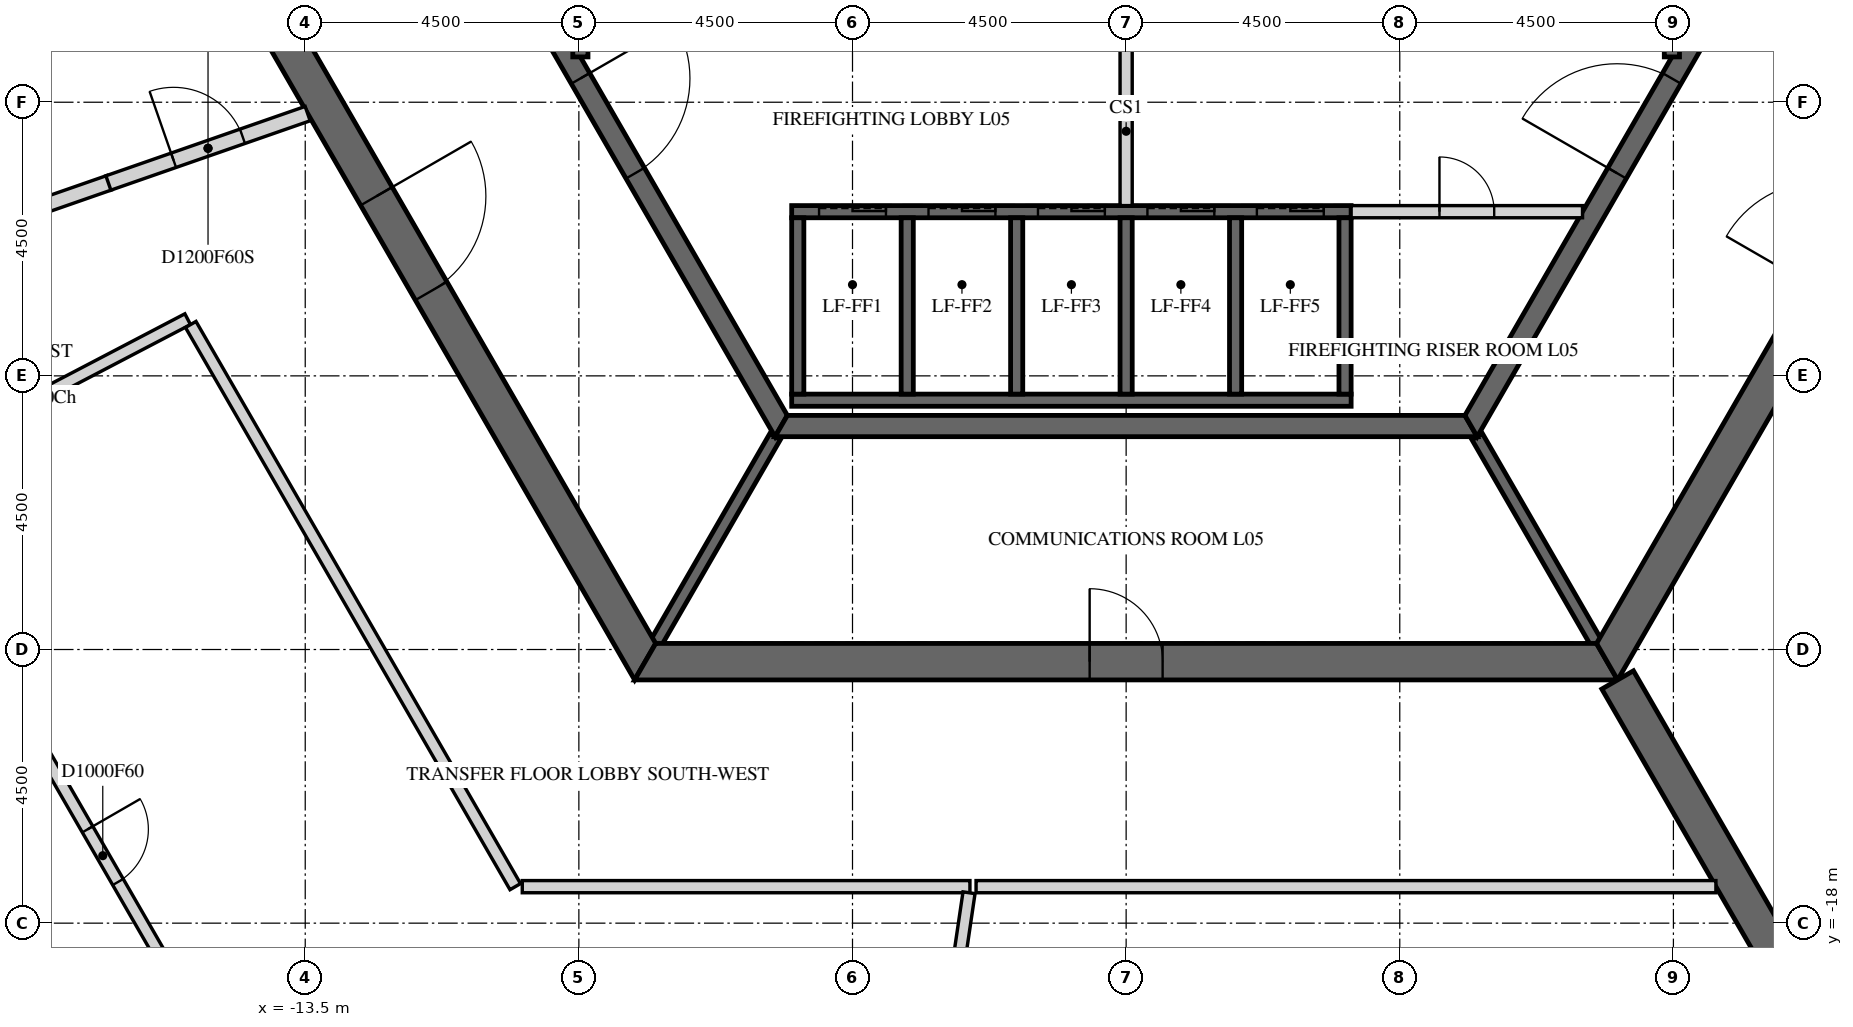
"""IFC4 building model, lengths in metres.
Left out: names, types, materials, properties, quantities, classifications, styles, units other than length and angle.
Written with IfcOpenShell. Run it as: python <this file> out.ifc"""

import sys

from ifc_helpers import new_model, si_unit, direction, frame, frame_2d, origin, place, context, subcontext, project, spatial, polyline, rectangle, outline, extrude, element, fill, save


model = new_model("IFC4")
c1 = context("Model", 3, precision=1e-05, world=origin(), true_north=direction((0.0, 1.0)))
c2 = subcontext(c1, "Body", "Model", "MODEL_VIEW")
j1 = project(units=[si_unit("LENGTHUNIT", "METRE"), si_unit("PLANEANGLEUNIT", "RADIAN")], contexts=[c1])
p1 = place(None, origin())
s1 = spatial("IfcSite", under=j1, at=p1, CompositionType="ELEMENT")
p2 = place(p1, origin())
s2 = spatial("IfcBuilding", under=s1, at=p2, CompositionType="ELEMENT")
p3 = place(p2, frame((0.0, 0.0, 31.5)))
s3 = spatial("IfcBuildingStorey", under=s2, at=p3, CompositionType="ELEMENT", Elevation=31.5)
p4 = place(p3, frame((-15.819, 0.0, -0.3), z_axis=(0.0, 0.0, 1.0), x_axis=(0.499999880136, -0.866025472988, 0.0)))
e1 = element("IfcWall", 1, at=p4, inside=s3, PredefinedType="SHEAR", context=c2, shape_type="SweptSolid", body=[
    extrude(outline(polyline([(-0.173, -0.3), (15.993, -0.3), (15.646, 0.3), (0.173, 0.3), (-0.173, -0.3)])), origin(), (0.0, 0.0, 1.0), 6.15),
])
p5 = place(p4, frame((6.981, 0.0, 0.3)))
e2 = element("IfcOpeningElement", 2, at=p5, cuts=e1, PredefinedType="OPENING", context=c2, shape_type="SweptSolid", body=[
    extrude(rectangle(XDim=1.8, YDim=2.4, at=frame_2d((0.9, 1.2))), frame((0.0, 0.31, 0.0), z_axis=(0.0, -1.0, 0.0), x_axis=(1.0, 0.0, 0.0)), (0.0, 0.0, 1.0), 0.62),
])
p6 = place(p3, frame((-7.91, -13.7, -0.3), z_axis=(0.0, 0.0, 1.0), x_axis=(1.0, 0.0, 0.0)))
e3 = element("IfcWall", 3, at=p6, inside=s3, PredefinedType="SHEAR", context=c2, shape_type="SweptSolid", body=[
    extrude(outline(polyline([(-0.173, -0.3), (15.993, -0.3), (15.646, 0.3), (0.173, 0.3), (-0.173, -0.3)])), origin(), (0.0, 0.0, 1.0), 6.15),
])
p7 = place(p6, frame((7.31, 0.0, 0.3)))
e4 = element("IfcOpeningElement", 4, at=p7, cuts=e3, PredefinedType="OPENING", context=c2, shape_type="SweptSolid", body=[
    extrude(rectangle(XDim=1.2, YDim=2.4, at=frame_2d((0.6, 1.2))), frame((0.0, 0.31, 0.0), z_axis=(0.0, -1.0, 0.0), x_axis=(1.0, 0.0, 0.0)), (0.0, 0.0, 1.0), 0.62),
])
p8 = place(p3, frame((7.91, -13.7, -0.3), z_axis=(0.0, 0.0, 1.0), x_axis=(0.499999880136, 0.866025472988, 0.0)))
e5 = element("IfcWall", 5, at=p8, inside=s3, PredefinedType="SHEAR", context=c2, shape_type="SweptSolid", body=[
    extrude(outline(polyline([(-0.173, -0.3), (15.993, -0.3), (15.646, 0.3), (0.173, 0.3), (-0.173, -0.3)])), origin(), (0.0, 0.0, 1.0), 6.15),
])
p9 = place(p8, frame((7.039, 0.0, 0.3)))
e6 = element("IfcOpeningElement", 6, at=p9, cuts=e5, PredefinedType="OPENING", context=c2, shape_type="SweptSolid", body=[
    extrude(rectangle(XDim=1.8, YDim=2.4, at=frame_2d((0.9, 1.2))), frame((0.0, 0.31, 0.0), z_axis=(0.0, -1.0, 0.0), x_axis=(1.0, 0.0, 0.0)), (0.0, 0.0, 1.0), 0.62),
])
p10 = place(p3, frame((8.083, -14.0, -0.3), z_axis=(0.0, 0.0, 1.0), x_axis=(0.499997680643, -0.866026742862, 0.0)))
e7 = element("IfcWall", 7, at=p10, inside=s3, PredefinedType="SHEAR", context=c2, shape_type="SweptSolid", body=[
    extrude(rectangle(XDim=16.509, YDim=0.6, at=frame_2d((8.254, 0.0))), origin(), (0.0, 0.0, 1.0), 6.15),
])
p11 = place(p10, frame((7.354, 0.0, 0.3)))
e8 = element("IfcOpeningElement", 8, at=p11, cuts=e7, PredefinedType="OPENING", context=c2, shape_type="SweptSolid", body=[
    extrude(rectangle(XDim=1.8, YDim=2.4, at=frame_2d((0.9, 1.2))), frame((0.0, 0.31, 0.0), z_axis=(0.0, -1.0, 0.0), x_axis=(1.0, 0.0, 0.0)), (0.0, 0.0, 1.0), 0.62),
])
p12 = place(p3, frame((-11.345, 0.0, -0.3), z_axis=(0.0, 0.0, 1.0), x_axis=(0.499995046907, -0.866028263435, 0.0)))
e9 = element("IfcWall", 9, at=p12, inside=s3, PredefinedType="SHEAR", context=c2, shape_type="SweptSolid", body=[
    extrude(outline(polyline([(-0.101, -0.175), (11.446, -0.175), (11.244, 0.175), (0.101, 0.175), (-0.101, -0.175)])), origin(), (0.0, 0.0, 1.0), 6.15),
])
p13 = place(p12, frame((4.744, 0.0, 0.3)))
e10 = element("IfcOpeningElement", 10, at=p13, cuts=e9, PredefinedType="OPENING", context=c2, shape_type="SweptSolid", body=[
    extrude(rectangle(XDim=1.8, YDim=2.4, at=frame_2d((0.9, 1.2))), frame((0.0, 0.185, 0.0), z_axis=(0.0, -1.0, 0.0), x_axis=(1.0, 0.0, 0.0)), (0.0, 0.0, 1.0), 0.37),
])
p14 = place(p3, frame((-5.673, -9.825, -0.3), z_axis=(0.0, 0.0, 1.0), x_axis=(1.0, 0.0, 0.0)))
e11 = element("IfcWall", 11, at=p14, inside=s3, PredefinedType="SHEAR", context=c2, shape_type="SweptSolid", body=[
    extrude(outline(polyline([(-0.101, -0.175), (11.446, -0.175), (11.244, 0.175), (0.101, 0.175), (-0.101, -0.175)])), origin(), (0.0, 0.0, 1.0), 6.15),
])
p15 = place(p3, frame((5.673, -9.825, -0.3), z_axis=(0.0, 0.0, 1.0), x_axis=(0.499995046907, 0.866028263435, 0.0)))
e12 = element("IfcWall", 12, at=p15, inside=s3, PredefinedType="SHEAR", context=c2, shape_type="SweptSolid", body=[
    extrude(outline(polyline([(-0.101, -0.175), (11.446, -0.175), (11.244, 0.175), (0.101, 0.175), (-0.101, -0.175)])), origin(), (0.0, 0.0, 1.0), 6.15),
])
p16 = place(p15, frame((4.801, 0.0, 0.3)))
e13 = element("IfcOpeningElement", 13, at=p16, cuts=e12, PredefinedType="OPENING", context=c2, shape_type="SweptSolid", body=[
    extrude(rectangle(XDim=1.8, YDim=2.4, at=frame_2d((0.9, 1.2))), frame((0.0, 0.185, 0.0), z_axis=(0.0, -1.0, 0.0), x_axis=(1.0, 0.0, 0.0)), (0.0, 0.0, 1.0), 0.37),
])
p17 = place(p3, frame((-5.5, -6.3, -0.25), z_axis=(0.0, 0.0, 1.0), x_axis=(1.0, 0.0, 0.0)))
e14 = element("IfcWall", 14, at=p17, inside=s3, PredefinedType="SHEAR", context=c2, shape_type="SweptSolid", body=[
    extrude(rectangle(XDim=9.2, YDim=0.2, at=frame_2d((4.6, 0.0))), origin(), (0.0, 0.0, 1.0), 6.0),
])
p18 = place(p17, frame((0.45, 0.0, 0.25)))
e15 = element("IfcOpeningElement", 15, at=p18, cuts=e14, PredefinedType="OPENING", context=c2, shape_type="SweptSolid", body=[
    extrude(rectangle(XDim=1.1, YDim=2.1, at=frame_2d((0.55, 1.05))), frame((0.0, 0.11, 0.0), z_axis=(0.0, -1.0, 0.0), x_axis=(1.0, 0.0, 0.0)), (0.0, 0.0, 1.0), 0.22),
])
p19 = place(p17, frame((2.25, 0.0, 0.25)))
e16 = element("IfcOpeningElement", 16, at=p19, cuts=e14, PredefinedType="OPENING", context=c2, shape_type="SweptSolid", body=[
    extrude(rectangle(XDim=1.1, YDim=2.1, at=frame_2d((0.55, 1.05))), frame((0.0, 0.11, 0.0), z_axis=(0.0, -1.0, 0.0), x_axis=(1.0, 0.0, 0.0)), (0.0, 0.0, 1.0), 0.22),
])
p20 = place(p17, frame((4.05, 0.0, 0.25)))
e17 = element("IfcOpeningElement", 17, at=p20, cuts=e14, PredefinedType="OPENING", context=c2, shape_type="SweptSolid", body=[
    extrude(rectangle(XDim=1.1, YDim=2.1, at=frame_2d((0.55, 1.05))), frame((0.0, 0.11, 0.0), z_axis=(0.0, -1.0, 0.0), x_axis=(1.0, 0.0, 0.0)), (0.0, 0.0, 1.0), 0.22),
])
p21 = place(p17, frame((5.85, 0.0, 0.25)))
e18 = element("IfcOpeningElement", 18, at=p21, cuts=e14, PredefinedType="OPENING", context=c2, shape_type="SweptSolid", body=[
    extrude(rectangle(XDim=1.1, YDim=2.1, at=frame_2d((0.55, 1.05))), frame((0.0, 0.11, 0.0), z_axis=(0.0, -1.0, 0.0), x_axis=(1.0, 0.0, 0.0)), (0.0, 0.0, 1.0), 0.22),
])
p22 = place(p17, frame((7.65, 0.0, 0.25)))
e19 = element("IfcOpeningElement", 19, at=p22, cuts=e14, PredefinedType="OPENING", context=c2, shape_type="SweptSolid", body=[
    extrude(rectangle(XDim=1.1, YDim=2.1, at=frame_2d((0.55, 1.05))), frame((0.0, 0.11, 0.0), z_axis=(0.0, -1.0, 0.0), x_axis=(1.0, 0.0, 0.0)), (0.0, 0.0, 1.0), 0.22),
])
p23 = place(p3, frame((-5.5, -9.4, -0.25), z_axis=(0.0, 0.0, 1.0), x_axis=(1.0, 0.0, 0.0)))
e20 = element("IfcWall", 20, at=p23, inside=s3, PredefinedType="SHEAR", context=c2, shape_type="SweptSolid", body=[
    extrude(rectangle(XDim=9.2, YDim=0.2, at=frame_2d((4.6, 0.0))), origin(), (0.0, 0.0, 1.0), 6.0),
])
for number, where, z_axis, x_axis in (
    (21, (-5.4, -9.3, -0.25), (0.0, 0.0, 1.0), (0.0, 1.0, 0.0)),
    (22, (-3.6, -9.3, -0.25), (0.0, 0.0, 1.0), (0.0, 1.0, 0.0)),
    (23, (-1.8, -9.3, -0.25), (0.0, 0.0, 1.0), (0.0, 1.0, 0.0)),
    (24, (0.0, -9.3, -0.25), (0.0, 0.0, 1.0), (0.0, 1.0, 0.0)),
    (25, (1.8, -9.3, -0.25), (0.0, 0.0, 1.0), (0.0, 1.0, 0.0)),
    (26, (3.6, -9.3, -0.25), (0.0, 0.0, 1.0), (0.0, 1.0, 0.0)),
):
    element("IfcWall", number, at=place(p3, frame(where, z_axis=z_axis, x_axis=x_axis)), inside=s3, PredefinedType="SHEAR", context=c2, shape_type="SweptSolid", body=[
        extrude(rectangle(XDim=2.9, YDim=0.2, at=frame_2d((1.45, 0.0))), origin(), (0.0, 0.0, 1.0), 6.0),
    ])
p24 = place(p3, frame((0.0, -6.2, 0.0), z_axis=(0.0, 0.0, 1.0), x_axis=(0.0, 1.0, 0.0)))
e27 = element("IfcWall", 27, at=p24, inside=s3, PredefinedType="PARTITIONING", context=c2, shape_type="SweptSolid", body=[
    extrude(rectangle(XDim=6.1, YDim=0.2, at=frame_2d((3.05, 0.0))), origin(), (0.0, 0.0, 1.0), 5.75),
])
p25 = place(p3, frame((3.7, -6.3, 0.0), z_axis=(0.0, 0.0, 1.0), x_axis=(1.0, 0.0, 0.0)))
e28 = element("IfcWall", 28, at=p25, inside=s3, PredefinedType="PARTITIONING", context=c2, shape_type="SweptSolid", body=[
    extrude(rectangle(XDim=3.806, YDim=0.2, at=frame_2d((1.903, 0.0))), origin(), (0.0, 0.0, 1.0), 5.75),
])
p26 = place(p25, frame((1.453, 0.0, 0.0)))
e29 = element("IfcOpeningElement", 29, at=p26, cuts=e28, PredefinedType="OPENING", context=c2, shape_type="SweptSolid", body=[
    extrude(rectangle(XDim=0.9, YDim=2.1, at=frame_2d((0.45, 1.05))), frame((0.0, 0.11, 0.0), z_axis=(0.0, -1.0, 0.0), x_axis=(1.0, 0.0, 0.0)), (0.0, 0.0, 1.0), 0.22),
])
for number, where, z_axis, x_axis in (
    (30, (-5.773, -10.0, -0.3), (0.0, 0.0, 1.0), (-0.5, -0.866, 0.0)),
    (31, (5.773, -10.0, -0.3), (0.0, 0.0, 1.0), (0.5, -0.866, 0.0)),
):
    element("IfcWall", number, at=place(p3, frame(where, z_axis=z_axis, x_axis=x_axis)), inside=s3, PredefinedType="SHEAR", context=c2, shape_type="SweptSolid", body=[
        extrude(rectangle(XDim=3.926, YDim=0.2, at=frame_2d((1.963, 0.0))), origin(), (0.0, 0.0, 1.0), 6.15),
    ])
for number, where, z_axis, x_axis in (
    (32, (8.975, -3.755, -0.25), (0.0, 0.0, 1.0), (0.0, 1.0, 0.0)),
    (33, (-8.975, -3.755, -0.25), (0.0, 0.0, 1.0), (0.0, 1.0, 0.0)),
):
    element("IfcWall", number, at=place(p3, frame(where, z_axis=z_axis, x_axis=x_axis)), inside=s3, PredefinedType="SHEAR", context=c2, shape_type="SweptSolid", body=[
        extrude(rectangle(XDim=7.51, YDim=0.25, at=frame_2d((3.755, 0.0))), origin(), (0.0, 0.0, 1.0), 6.0),
    ])
p27 = place(p3, frame((-16.286, -23.432, 0.0), z_axis=(0.0, 0.0, 1.0), x_axis=(-0.49996436611, 0.866045976043, 0.0)))
e34 = element("IfcWall", 34, at=p27, inside=s3, PredefinedType="PARTITIONING", context=c2, shape_type="SweptSolid", body=[
    extrude(rectangle(XDim=16.948, YDim=0.2, at=frame_2d((8.474, 0.0))), origin(), (0.0, 0.0, 1.0), 5.85),
])
p28 = place(p27, frame((7.974, 0.0, 0.0)))
e35 = element("IfcOpeningElement", 35, at=p28, cuts=e34, PredefinedType="OPENING", context=c2, shape_type="SweptSolid", body=[
    extrude(rectangle(XDim=1.0, YDim=2.1, at=frame_2d((0.5, 1.05))), frame((0.0, 0.11, 0.0), z_axis=(0.0, -1.0, 0.0), x_axis=(1.0, 0.0, 0.0)), (0.0, 0.0, 1.0), 0.22),
])
p29 = place(p3, frame((-20.418, -10.674, 0.0), z_axis=(0.0, 0.0, 1.0), x_axis=(0.886208434204, 0.463286748295, 0.0)))
e36 = element("IfcWall", 36, at=p29, inside=s3, PredefinedType="PARTITIONING", context=c2, shape_type="SweptSolid", body=[
    extrude(rectangle(XDim=5.625, YDim=0.2, at=frame_2d((2.812, 0.0))), origin(), (0.0, 0.0, 1.0), 5.096),
])
p30 = place(p3, frame((-16.718, -5.822, 0.0), z_axis=(0.0, 0.0, 1.0), x_axis=(-0.944407858517, -0.328776210774, 0.0)))
e37 = element("IfcWall", 37, at=p30, inside=s3, PredefinedType="PARTITIONING", context=c2, shape_type="SweptSolid", body=[
    extrude(rectangle(XDim=5.742, YDim=0.25, at=frame_2d((2.871, 0.0))), origin(), (0.0, 0.0, 1.0), 5.088),
])
p31 = place(p3, frame((-15.383, -8.155, 0.0), z_axis=(0.0, 0.0, 1.0), x_axis=(0.499963979216, -0.866046199395, 0.0)))
e38 = element("IfcWall", 38, at=p31, inside=s3, PredefinedType="PARTITIONING", context=c2, shape_type="SweptSolid", body=[
    extrude(rectangle(XDim=10.675, YDim=0.2, at=frame_2d((5.337, 0.0))), origin(), (0.0, 0.0, 1.0), 5.85),
])
p32 = place(p3, frame((-16.737, -5.828, 0.0), z_axis=(0.0, 0.0, 1.0), x_axis=(0.944406589831, 0.328779855046, 0.0)))
e39 = element("IfcWall", 39, at=p32, inside=s3, PredefinedType="PARTITIONING", context=c2, shape_type="SweptSolid", body=[
    extrude(rectangle(XDim=3.47, YDim=0.25, at=frame_2d((1.735, 0.0))), origin(), (0.0, 0.0, 1.0), 5.85),
])
p33 = place(p32, frame((1.135, 0.0, 0.0)))
e40 = element("IfcOpeningElement", 40, at=p33, cuts=e39, PredefinedType="OPENING", context=c2, shape_type="SweptSolid", body=[
    extrude(rectangle(XDim=1.2, YDim=2.1, at=frame_2d((0.6, 1.05))), frame((0.0, 0.135, 0.0), z_axis=(0.0, -1.0, 0.0), x_axis=(1.0, 0.0, 0.0)), (0.0, 0.0, 1.0), 0.27),
])
p34 = place(p3, frame((-20.368, -10.761, 0.0), z_axis=(0.0, 0.0, 1.0), x_axis=(0.49994739805, -0.866055771404, 0.0)))
e41 = element("IfcWall", 41, at=p34, inside=s3, PredefinedType="PARTITIONING", context=c2, shape_type="SweptSolid", body=[
    extrude(rectangle(XDim=14.155, YDim=0.2, at=frame_2d((7.078, 0.0))), origin(), (0.0, 0.0, 1.0), 5.85),
])
p35 = place(p34, frame((6.578, 0.0, 0.0)))
e42 = element("IfcOpeningElement", 42, at=p35, cuts=e41, PredefinedType="OPENING", context=c2, shape_type="SweptSolid", body=[
    extrude(rectangle(XDim=1.0, YDim=2.1, at=frame_2d((0.5, 1.05))), frame((0.0, 0.11, 0.0), z_axis=(0.0, -1.0, 0.0), x_axis=(1.0, 0.0, 0.0)), (0.0, 0.0, 1.0), 0.22),
])
p36 = place(p3, frame((-9.93, -17.4, 0.0), z_axis=(0.0, 0.0, 1.0), x_axis=(1.0, 0.0, 0.0)))
e43 = element("IfcWall", 43, at=p36, inside=s3, PredefinedType="PARTITIONING", context=c2, shape_type="SweptSolid", body=[
    extrude(rectangle(XDim=7.361, YDim=0.2, at=frame_2d((3.681, 0.0))), origin(), (0.0, 0.0, 1.0), 5.85),
])
p37 = place(p3, frame((-3.384, -22.92, 0.0), z_axis=(0.0, 0.0, 1.0), x_axis=(0.146117446513, 0.98926724995, 0.0)))
e44 = element("IfcWall", 44, at=p37, inside=s3, PredefinedType="PARTITIONING", context=c2, shape_type="SweptSolid", body=[
    extrude(rectangle(XDim=5.479, YDim=0.2, at=frame_2d((2.739, 0.0))), origin(), (0.0, 0.0, 1.0), 5.85),
])
p38 = place(p3, frame((-2.468, -17.4, 0.0), z_axis=(0.0, 0.0, 1.0), x_axis=(1.0, 0.0, 0.0)))
e45 = element("IfcWall", 45, at=p38, inside=s3, PredefinedType="PARTITIONING", context=c2, shape_type="SweptSolid", body=[
    extrude(rectangle(XDim=12.167, YDim=0.2, at=frame_2d((6.083, 0.0))), origin(), (0.0, 0.0, 1.0), 5.85),
])
p39 = place(p5, origin())
e46 = element("IfcDoor", 46, at=p39, inside=s3, OperationType="DOUBLE_DOOR_SINGLE_SWING", PredefinedType="DOOR", context=c2, shape_type="SweptSolid", body=[
    extrude(rectangle(XDim=1.8, YDim=2.4, at=frame_2d((0.9, 1.2))), frame((0.0, 0.025, 0.0), z_axis=(0.0, -1.0, 0.0), x_axis=(1.0, 0.0, 0.0)), (0.0, 0.0, 1.0), 0.05),
])
fill(e2, e46)
p40 = place(p7, origin())
e47 = element("IfcDoor", 47, at=p40, inside=s3, OperationType="SINGLE_SWING_LEFT", PredefinedType="DOOR", context=c2, shape_type="SweptSolid", body=[
    extrude(rectangle(XDim=1.2, YDim=2.4, at=frame_2d((0.6, 1.2))), frame((0.0, 0.025, 0.0), z_axis=(0.0, -1.0, 0.0), x_axis=(1.0, 0.0, 0.0)), (0.0, 0.0, 1.0), 0.05),
])
fill(e4, e47)
p41 = place(p13, origin())
e48 = element("IfcDoor", 48, at=p41, inside=s3, OperationType="DOUBLE_DOOR_SINGLE_SWING", PredefinedType="DOOR", context=c2, shape_type="SweptSolid", body=[
    extrude(rectangle(XDim=1.8, YDim=2.4, at=frame_2d((0.9, 1.2))), frame((0.0, 0.025, 0.0), z_axis=(0.0, -1.0, 0.0), x_axis=(1.0, 0.0, 0.0)), (0.0, 0.0, 1.0), 0.05),
])
fill(e10, e48)
p42 = place(p16, origin())
e49 = element("IfcDoor", 49, at=p42, inside=s3, OperationType="DOUBLE_DOOR_SINGLE_SWING", PredefinedType="DOOR", context=c2, shape_type="SweptSolid", body=[
    extrude(rectangle(XDim=1.8, YDim=2.4, at=frame_2d((0.9, 1.2))), frame((0.0, 0.025, 0.0), z_axis=(0.0, -1.0, 0.0), x_axis=(1.0, 0.0, 0.0)), (0.0, 0.0, 1.0), 0.05),
])
fill(e13, e49)
p43 = place(p26, origin())
e50 = element("IfcDoor", 50, at=p43, inside=s3, OperationType="SINGLE_SWING_LEFT", PredefinedType="DOOR", context=c2, shape_type="SweptSolid", body=[
    extrude(rectangle(XDim=0.9, YDim=2.1, at=frame_2d((0.45, 1.05))), frame((0.0, 0.025, 0.0), z_axis=(0.0, -1.0, 0.0), x_axis=(1.0, 0.0, 0.0)), (0.0, 0.0, 1.0), 0.05),
])
fill(e29, e50)
p44 = place(p18, origin())
e51 = element("IfcDoor", 51, at=p44, inside=s3, OperationType="SLIDING_TO_LEFT", PredefinedType="DOOR", context=c2, shape_type="SweptSolid", body=[
    extrude(rectangle(XDim=1.1, YDim=2.1, at=frame_2d((0.55, 1.05))), frame((0.0, 0.025, 0.0), z_axis=(0.0, -1.0, 0.0), x_axis=(1.0, 0.0, 0.0)), (0.0, 0.0, 1.0), 0.05),
])
fill(e15, e51)
p45 = place(p19, origin())
e52 = element("IfcDoor", 52, at=p45, inside=s3, OperationType="SLIDING_TO_LEFT", PredefinedType="DOOR", context=c2, shape_type="SweptSolid", body=[
    extrude(rectangle(XDim=1.1, YDim=2.1, at=frame_2d((0.55, 1.05))), frame((0.0, 0.025, 0.0), z_axis=(0.0, -1.0, 0.0), x_axis=(1.0, 0.0, 0.0)), (0.0, 0.0, 1.0), 0.05),
])
fill(e16, e52)
p46 = place(p20, origin())
e53 = element("IfcDoor", 53, at=p46, inside=s3, OperationType="SLIDING_TO_LEFT", PredefinedType="DOOR", context=c2, shape_type="SweptSolid", body=[
    extrude(rectangle(XDim=1.1, YDim=2.1, at=frame_2d((0.55, 1.05))), frame((0.0, 0.025, 0.0), z_axis=(0.0, -1.0, 0.0), x_axis=(1.0, 0.0, 0.0)), (0.0, 0.0, 1.0), 0.05),
])
fill(e17, e53)
p47 = place(p21, origin())
e54 = element("IfcDoor", 54, at=p47, inside=s3, OperationType="SLIDING_TO_LEFT", PredefinedType="DOOR", context=c2, shape_type="SweptSolid", body=[
    extrude(rectangle(XDim=1.1, YDim=2.1, at=frame_2d((0.55, 1.05))), frame((0.0, 0.025, 0.0), z_axis=(0.0, -1.0, 0.0), x_axis=(1.0, 0.0, 0.0)), (0.0, 0.0, 1.0), 0.05),
])
fill(e18, e54)
p48 = place(p22, origin())
e55 = element("IfcDoor", 55, at=p48, inside=s3, OperationType="SLIDING_TO_LEFT", PredefinedType="DOOR", context=c2, shape_type="SweptSolid", body=[
    extrude(rectangle(XDim=1.1, YDim=2.1, at=frame_2d((0.55, 1.05))), frame((0.0, 0.025, 0.0), z_axis=(0.0, -1.0, 0.0), x_axis=(1.0, 0.0, 0.0)), (0.0, 0.0, 1.0), 0.05),
])
fill(e19, e55)
p49 = place(p33, origin())
e56 = element("IfcDoor", 56, at=p49, inside=s3, OperationType="SINGLE_SWING_RIGHT", PredefinedType="DOOR", context=c2, shape_type="SweptSolid", body=[
    extrude(rectangle(XDim=1.2, YDim=2.1, at=frame_2d((0.6, 1.05))), frame((0.0, 0.025, 0.0), z_axis=(0.0, -1.0, 0.0), x_axis=(1.0, 0.0, 0.0)), (0.0, 0.0, 1.0), 0.05),
])
fill(e40, e56)
p50 = place(p35, origin())
e57 = element("IfcDoor", 57, at=p50, inside=s3, OperationType="SINGLE_SWING_LEFT", PredefinedType="DOOR", context=c2, shape_type="SweptSolid", body=[
    extrude(rectangle(XDim=1.0, YDim=2.1, at=frame_2d((0.5, 1.05))), frame((0.0, 0.025, 0.0), z_axis=(0.0, -1.0, 0.0), x_axis=(1.0, 0.0, 0.0)), (0.0, 0.0, 1.0), 0.05),
])
fill(e42, e57)
save(model, sys.argv[1])
